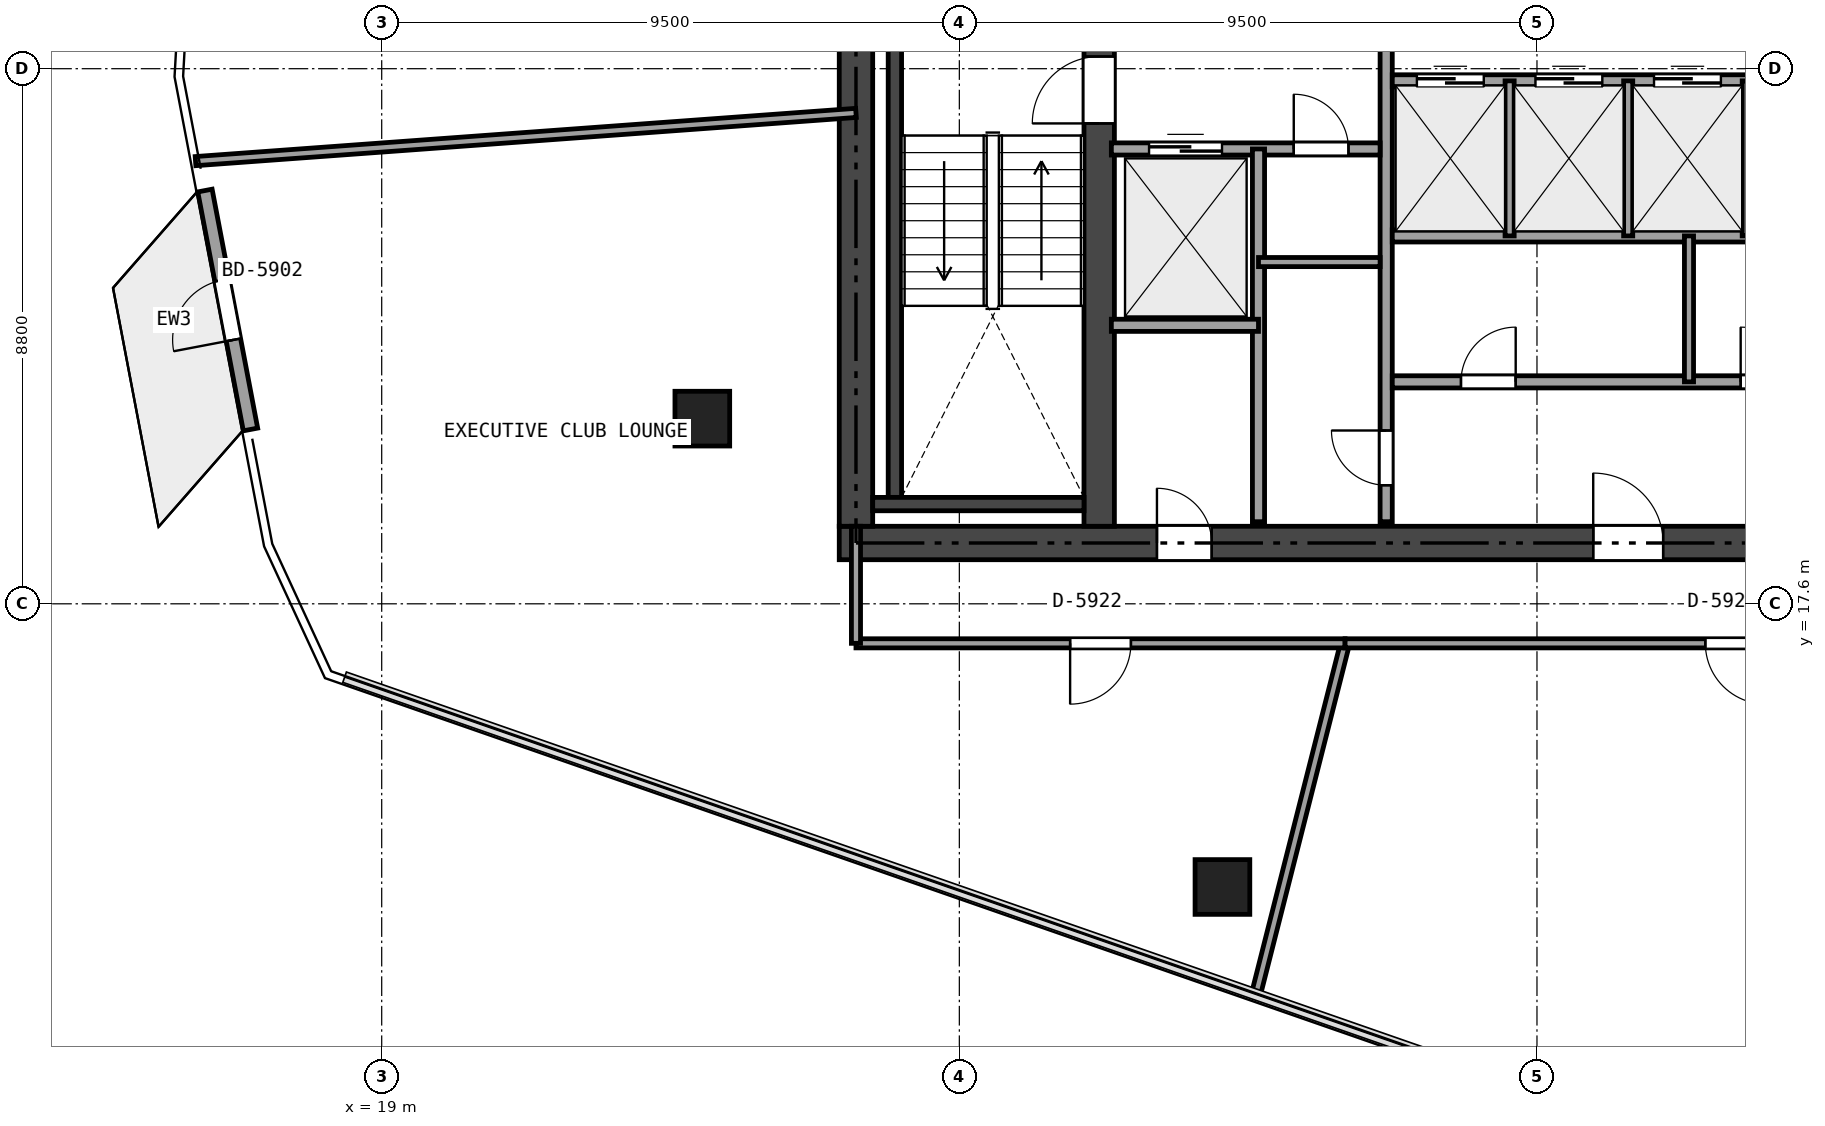
"""IFC4 building model, lengths in metres.
Left out: names, types, materials, properties, quantities, classifications, styles, units other than length and angle.
Written with IfcOpenShell. Run it as: python <this file> out.ifc"""

import sys

from ifc_helpers import new_model, si_unit, direction, frame, frame_2d, origin, origin_2d, place, context, subcontext, project, spatial, rectangle, extrude, element, fill, save


model = new_model("IFC4")
c1 = context("Model", 3, precision=1e-05, world=origin(), true_north=direction((0.0, 1.0)))
c2 = subcontext(c1, "Body", "Model", "MODEL_VIEW")
j1 = project(units=[si_unit("LENGTHUNIT", "METRE"), si_unit("PLANEANGLEUNIT", "RADIAN")], contexts=[c1])
p1 = place(None, origin())
s1 = spatial("IfcSite", under=j1, at=p1, CompositionType="ELEMENT")
p2 = place(p1, origin())
s2 = spatial("IfcBuilding", under=s1, at=p2, CompositionType="ELEMENT")
p3 = place(p2, frame((0.0, 0.0, 220.2)))
s3 = spatial("IfcBuildingStorey", under=s2, at=p3, CompositionType="ELEMENT", Elevation=220.2)
p4 = place(p3, frame((26.525, 18.6, 0.0), z_axis=(0.0, 0.0, 1.0), x_axis=(1.0, 0.0, 0.0)))
e1 = element("IfcWall", 1, at=p4, inside=s3, PredefinedType="SHEAR", context=c2, shape_type="SweptSolid", body=[
    extrude(rectangle(XDim=21.35, YDim=0.55, at=frame_2d((10.675, 0.0))), origin(), (0.0, 0.0, 1.0), 3.24),
])
p5 = place(p4, frame((12.4, 0.0, 0.0)))
e2 = element("IfcOpeningElement", 2, at=p5, cuts=e1, PredefinedType="OPENING", context=c2, shape_type="SweptSolid", body=[
    extrude(rectangle(XDim=1.15, YDim=2.15, at=frame_2d((0.575, 1.075))), frame((0.0, 0.285, 0.0), z_axis=(0.0, -1.0, 0.0), x_axis=(1.0, 0.0, 0.0)), (0.0, 0.0, 1.0), 0.57),
])
p6 = place(p4, frame((5.225, 0.0, 0.0)))
e3 = element("IfcOpeningElement", 3, at=p6, cuts=e1, PredefinedType="OPENING", context=c2, shape_type="SweptSolid", body=[
    extrude(rectangle(XDim=0.9, YDim=2.1, at=frame_2d((0.45, 1.05))), frame((0.0, 0.285, 0.0), z_axis=(0.0, -1.0, 0.0), x_axis=(1.0, 0.0, 0.0)), (0.0, 0.0, 1.0), 0.57),
])
p7 = place(p3, frame((26.8, 18.875, 0.0), z_axis=(0.0, 0.0, 1.0), x_axis=(0.0, 1.0, 0.0)))
e4 = element("IfcWall", 4, at=p7, inside=s3, PredefinedType="SHEAR", context=c2, shape_type="SweptSolid", body=[
    extrude(rectangle(XDim=15.05, YDim=0.55, at=frame_2d((7.525, 0.0))), origin(), (0.0, 0.0, 1.0), 3.24),
])
p8 = place(p3, frame((30.8, 18.875, 0.0), z_axis=(0.0, 0.0, 1.0), x_axis=(0.0, 1.0, 0.0)))
e5 = element("IfcWall", 5, at=p8, inside=s3, PredefinedType="SHEAR", context=c2, shape_type="SweptSolid", body=[
    extrude(rectangle(XDim=15.05, YDim=0.5, at=frame_2d((7.525, 0.0))), origin(), (0.0, 0.0, 1.0), 3.24),
])
p9 = place(p8, frame((6.625, 0.0, 0.0)))
e6 = element("IfcOpeningElement", 6, at=p9, cuts=e5, PredefinedType="OPENING", context=c2, shape_type="SweptSolid", body=[
    extrude(rectangle(XDim=1.1, YDim=2.15, at=frame_2d((0.55, 1.075))), frame((0.0, 0.26, 0.0), z_axis=(0.0, -1.0, 0.0), x_axis=(1.0, 0.0, 0.0)), (0.0, 0.0, 1.0), 0.52),
])
p10 = place(p8, frame((8.425, 0.0, 0.0)))
e7 = element("IfcOpeningElement", 7, at=p10, cuts=e5, PredefinedType="OPENING", context=c2, shape_type="SweptSolid", body=[
    extrude(rectangle(XDim=0.9, YDim=2.1, at=frame_2d((0.45, 1.05))), frame((0.0, 0.26, 0.0), z_axis=(0.0, -1.0, 0.0), x_axis=(1.0, 0.0, 0.0)), (0.0, 0.0, 1.0), 0.52),
])
p11 = place(p3, frame((27.44, 19.35, 0.0), z_axis=(0.0, 0.0, 1.0), x_axis=(0.0, 1.0, 0.0)))
e8 = element("IfcWall", 8, at=p11, inside=s3, PredefinedType="SHEAR", context=c2, shape_type="SweptSolid", body=[
    extrude(rectangle(XDim=7.4, YDim=0.22, at=frame_2d((3.7, 0.0))), origin(), (0.0, 0.0, 1.0), 3.24),
])
p12 = place(p3, frame((27.075, 19.24, 0.0), z_axis=(0.0, 0.0, 1.0), x_axis=(1.0, 0.0, 0.0)))
e9 = element("IfcWall", 9, at=p12, inside=s3, PredefinedType="SHEAR", context=c2, shape_type="SweptSolid", body=[
    extrude(rectangle(XDim=3.475, YDim=0.22, at=frame_2d((1.738, 0.0))), origin(), (0.0, 0.0, 1.0), 3.24),
])
for number, where, z_axis, x_axis in (
    (10, (24.273, 20.645, 0.0), (0.0, 0.0, 1.0), (1.0, 0.0, 0.0)),
    (11, (32.827, 12.943, 0.0), (0.0, 0.0, 1.0), (1.0, 0.0, 0.0)),
):
    element("IfcColumn", number, at=place(p3, frame(where, z_axis=z_axis, x_axis=x_axis)), inside=s3, PredefinedType="COLUMN", context=c2, shape_type="SweptSolid", body=[
        extrude(rectangle(XDim=0.9, YDim=0.9, at=origin_2d()), origin(), (0.0, 0.0, 1.0), 3.24),
    ])
p13 = place(p3, frame((16.842, 20.467, 0.0), z_axis=(0.0, 0.0, 1.0), x_axis=(-0.187269178691, 0.982308635161, 0.0)))
e12 = element("IfcWall", 12, at=p13, inside=s3, PredefinedType="SOLIDWALL", context=c2, shape_type="SweptSolid", body=[
    extrude(rectangle(XDim=4.0, YDim=0.24, at=frame_2d((2.0, 0.0))), origin(), (0.0, 0.0, 1.0), 3.24),
])
p14 = place(p13, frame((1.5, 0.0, 0.0)))
e13 = element("IfcOpeningElement", 13, at=p14, cuts=e12, PredefinedType="OPENING", context=c2, shape_type="SweptSolid", body=[
    extrude(rectangle(XDim=1.0, YDim=2.15, at=frame_2d((0.5, 1.075))), frame((0.0, 0.13, 0.0), z_axis=(0.0, -1.0, 0.0), x_axis=(1.0, 0.0, 0.0)), (0.0, 0.0, 1.0), 0.26),
])
p15 = place(p3, frame((35.52, 18.95, 0.0), z_axis=(0.0, 0.0, 1.0), x_axis=(0.0, 1.0, 0.0)))
e14 = element("IfcWall", 14, at=p15, inside=s3, PredefinedType="SOLIDWALL", context=c2, shape_type="SweptSolid", body=[
    extrude(rectangle(XDim=14.9, YDim=0.2, at=frame_2d((7.45, 0.0))), origin(), (0.0, 0.0, 1.0), 2.761),
])
p16 = place(p15, frame((7.755, 0.0, 0.0)))
e15 = element("IfcOpeningElement", 15, at=p16, cuts=e14, PredefinedType="OPENING", context=c2, shape_type="SweptSolid", body=[
    extrude(rectangle(XDim=0.95, YDim=2.15, at=frame_2d((0.475, 1.075))), frame((0.0, 0.11, 0.0), z_axis=(0.0, -1.0, 0.0), x_axis=(1.0, 0.0, 0.0)), (0.0, 0.0, 1.0), 0.22),
])
p17 = place(p15, frame((0.6, 0.0, 0.0)))
e16 = element("IfcOpeningElement", 16, at=p17, cuts=e14, PredefinedType="OPENING", context=c2, shape_type="SweptSolid", body=[
    extrude(rectangle(XDim=0.9, YDim=2.1, at=frame_2d((0.45, 1.05))), frame((0.0, 0.11, 0.0), z_axis=(0.0, -1.0, 0.0), x_axis=(1.0, 0.0, 0.0)), (0.0, 0.0, 1.0), 0.22),
])
p18 = place(p3, frame((31.0, 25.08, 0.0), z_axis=(0.0, 0.0, 1.0), x_axis=(1.0, 0.0, 0.0)))
e17 = element("IfcWall", 17, at=p18, inside=s3, PredefinedType="SOLIDWALL", context=c2, shape_type="SweptSolid", body=[
    extrude(rectangle(XDim=4.42, YDim=0.2, at=frame_2d((2.21, 0.0))), origin(), (0.0, 0.0, 1.0), 3.24),
])
p19 = place(p18, frame((3.0, 0.0, 0.0)))
e18 = element("IfcOpeningElement", 18, at=p19, cuts=e17, PredefinedType="OPENING", context=c2, shape_type="SweptSolid", body=[
    extrude(rectangle(XDim=0.9, YDim=2.1, at=frame_2d((0.45, 1.05))), frame((0.0, 0.11, 0.0), z_axis=(0.0, -1.0, 0.0), x_axis=(1.0, 0.0, 0.0)), (0.0, 0.0, 1.0), 0.22),
])
p20 = place(p18, frame((0.62, 0.0, 0.0)))
e19 = element("IfcOpeningElement", 19, at=p20, cuts=e17, PredefinedType="OPENING", context=c2, shape_type="SweptSolid", body=[
    extrude(rectangle(XDim=1.2, YDim=2.15, at=frame_2d((0.6, 1.075))), frame((0.0, 0.11, 0.0), z_axis=(0.0, -1.0, 0.0), x_axis=(1.0, 0.0, 0.0)), (0.0, 0.0, 1.0), 0.22),
])
p21 = place(p3, frame((33.42, 18.95, 0.0), z_axis=(0.0, 0.0, 1.0), x_axis=(0.0, 1.0, 0.0)))
e20 = element("IfcWall", 20, at=p21, inside=s3, PredefinedType="SOLIDWALL", context=c2, shape_type="SweptSolid", body=[
    extrude(rectangle(XDim=6.13, YDim=0.2, at=frame_2d((3.065, 0.0))), origin(), (0.0, 0.0, 1.0), 2.761),
])
p22 = place(p3, frame((31.0, 22.18, 0.0), z_axis=(0.0, 0.0, 1.0), x_axis=(1.0, 0.0, 0.0)))
e21 = element("IfcWall", 21, at=p22, inside=s3, PredefinedType="SOLIDWALL", context=c2, shape_type="SweptSolid", body=[
    extrude(rectangle(XDim=2.42, YDim=0.2, at=frame_2d((1.21, 0.0))), origin(), (0.0, 0.0, 1.0), 3.24),
])
p23 = place(p3, frame((33.42, 23.22, 0.0), z_axis=(0.0, 0.0, 1.0), x_axis=(1.0, 0.0, 0.0)))
e22 = element("IfcWall", 22, at=p23, inside=s3, PredefinedType="PARTITIONING", context=c2, shape_type="SweptSolid", body=[
    extrude(rectangle(XDim=2.0, YDim=0.15, at=frame_2d((1.0, 0.0))), origin(), (0.0, 0.0, 1.0), 3.24),
])
p24 = place(p3, frame((35.62, 26.2, 0.0), z_axis=(0.0, 0.0, 1.0), x_axis=(1.0, 0.0, 0.0)))
e23 = element("IfcWall", 23, at=p24, inside=s3, PredefinedType="SOLIDWALL", context=c2, shape_type="SweptSolid", body=[
    extrude(rectangle(XDim=7.88, YDim=0.2, at=frame_2d((3.94, 0.0))), origin(), (0.0, 0.0, 1.0), 3.24),
])
p25 = place(p24, frame((0.405, 0.0, 0.0)))
e24 = element("IfcOpeningElement", 24, at=p25, cuts=e23, PredefinedType="OPENING", context=c2, shape_type="SweptSolid", body=[
    extrude(rectangle(XDim=1.1, YDim=2.15, at=frame_2d((0.55, 1.075))), frame((0.0, 0.11, 0.0), z_axis=(0.0, -1.0, 0.0), x_axis=(1.0, 0.0, 0.0)), (0.0, 0.0, 1.0), 0.22),
])
p26 = place(p24, frame((2.355, 0.0, 0.0)))
e25 = element("IfcOpeningElement", 25, at=p26, cuts=e23, PredefinedType="OPENING", context=c2, shape_type="SweptSolid", body=[
    extrude(rectangle(XDim=1.1, YDim=2.15, at=frame_2d((0.55, 1.075))), frame((0.0, 0.11, 0.0), z_axis=(0.0, -1.0, 0.0), x_axis=(1.0, 0.0, 0.0)), (0.0, 0.0, 1.0), 0.22),
])
p27 = place(p24, frame((4.305, 0.0, 0.0)))
e26 = element("IfcOpeningElement", 26, at=p27, cuts=e23, PredefinedType="OPENING", context=c2, shape_type="SweptSolid", body=[
    extrude(rectangle(XDim=1.1, YDim=2.15, at=frame_2d((0.55, 1.075))), frame((0.0, 0.11, 0.0), z_axis=(0.0, -1.0, 0.0), x_axis=(1.0, 0.0, 0.0)), (0.0, 0.0, 1.0), 0.22),
])
p28 = place(p24, frame((6.255, 0.0, 0.0)))
e27 = element("IfcOpeningElement", 27, at=p28, cuts=e23, PredefinedType="OPENING", context=c2, shape_type="SweptSolid", body=[
    extrude(rectangle(XDim=1.1, YDim=2.15, at=frame_2d((0.55, 1.075))), frame((0.0, 0.11, 0.0), z_axis=(0.0, -1.0, 0.0), x_axis=(1.0, 0.0, 0.0)), (0.0, 0.0, 1.0), 0.22),
])
p29 = place(p3, frame((35.62, 23.65, 0.0), z_axis=(0.0, 0.0, 1.0), x_axis=(1.0, 0.0, 0.0)))
e28 = element("IfcWall", 28, at=p29, inside=s3, PredefinedType="SOLIDWALL", context=c2, shape_type="SweptSolid", body=[
    extrude(rectangle(XDim=7.88, YDim=0.2, at=frame_2d((3.94, 0.0))), origin(), (0.0, 0.0, 1.0), 2.761),
])
p30 = place(p3, frame((35.62, 21.25, 0.0), z_axis=(0.0, 0.0, 1.0), x_axis=(1.0, 0.0, 0.0)))
e29 = element("IfcWall", 29, at=p30, inside=s3, PredefinedType="SOLIDWALL", context=c2, shape_type="SweptSolid", body=[
    extrude(rectangle(XDim=7.88, YDim=0.2, at=frame_2d((3.94, 0.0))), origin(), (0.0, 0.0, 1.0), 3.24),
])
p31 = place(p30, frame((1.13, 0.0, 0.0)))
e30 = element("IfcOpeningElement", 30, at=p31, cuts=e29, PredefinedType="OPENING", context=c2, shape_type="SweptSolid", body=[
    extrude(rectangle(XDim=0.9, YDim=2.1, at=frame_2d((0.45, 1.05))), frame((0.0, 0.11, 0.0), z_axis=(0.0, -1.0, 0.0), x_axis=(1.0, 0.0, 0.0)), (0.0, 0.0, 1.0), 0.22),
])
p32 = place(p30, frame((5.73, 0.0, 0.0)))
e31 = element("IfcOpeningElement", 31, at=p32, cuts=e29, PredefinedType="OPENING", context=c2, shape_type="SweptSolid", body=[
    extrude(rectangle(XDim=0.9, YDim=2.1, at=frame_2d((0.45, 1.05))), frame((0.0, 0.11, 0.0), z_axis=(0.0, -1.0, 0.0), x_axis=(1.0, 0.0, 0.0)), (0.0, 0.0, 1.0), 0.22),
])
for number, where, z_axis, x_axis in (
    (32, (37.55, 23.65, 0.0), (0.0, 0.0, 1.0), (0.0, 1.0, 0.0)),
    (33, (39.5, 23.65, 0.0), (0.0, 0.0, 1.0), (0.0, 1.0, 0.0)),
    (34, (41.45, 23.65, 0.0), (0.0, 0.0, 1.0), (0.0, 1.0, 0.0)),
):
    element("IfcWall", number, at=place(p3, frame(where, z_axis=z_axis, x_axis=x_axis)), inside=s3, PredefinedType="PARTITIONING", context=c2, shape_type="SweptSolid", body=[
        extrude(rectangle(XDim=2.55, YDim=0.15, at=frame_2d((1.275, 0.0))), origin(), (0.0, 0.0, 1.0), 2.761),
    ])
p33 = place(p3, frame((40.5, 21.25, 0.0), z_axis=(0.0, 0.0, 1.0), x_axis=(0.0, 1.0, 0.0)))
e35 = element("IfcWall", 35, at=p33, inside=s3, PredefinedType="PARTITIONING", context=c2, shape_type="SweptSolid", body=[
    extrude(rectangle(XDim=2.4, YDim=0.15, at=frame_2d((1.2, 0.0))), origin(), (0.0, 0.0, 1.0), 2.761),
])
p34 = place(p3, frame((15.938, 24.88, 0.0), z_axis=(0.0, 0.0, 1.0), x_axis=(0.997344218628, 0.072832064155, 0.0)))
e36 = element("IfcWall", 36, at=p34, inside=s3, PredefinedType="PARTITIONING", context=c2, shape_type="SweptSolid", body=[
    extrude(rectangle(XDim=10.891, YDim=0.15, at=frame_2d((5.445, 0.0))), origin(), (0.0, 0.0, 1.0), 2.825),
])
p35 = place(p3, frame((33.367, 11.134, 0.0), z_axis=(0.0, 0.0, 1.0), x_axis=(0.246152632785, 0.969231077387, 0.0)))
e37 = element("IfcWall", 37, at=p35, inside=s3, PredefinedType="PARTITIONING", context=c2, shape_type="SweptSolid", body=[
    extrude(rectangle(XDim=6.0, YDim=0.15, at=frame_2d((3.0, 0.0))), origin(), (0.0, 0.0, 1.0), 2.825),
])
p36 = place(p3, frame((34.844, 16.95, 0.0), z_axis=(0.0, 0.0, 1.0), x_axis=(-1.0, 0.0, 0.0)))
e38 = element("IfcWall", 38, at=p36, inside=s3, PredefinedType="PARTITIONING", context=c2, shape_type="SweptSolid", body=[
    extrude(rectangle(XDim=8.044, YDim=0.15, at=frame_2d((4.022, 0.0))), origin(), (0.0, 0.0, 1.0), 2.617),
])
p37 = place(p36, frame((3.522, 0.0, 0.0)))
e39 = element("IfcOpeningElement", 39, at=p37, cuts=e38, PredefinedType="OPENING", context=c2, shape_type="SweptSolid", body=[
    extrude(rectangle(XDim=1.0, YDim=2.15, at=frame_2d((0.5, 1.075))), frame((0.0, 0.085, 0.0), z_axis=(0.0, -1.0, 0.0), x_axis=(1.0, 0.0, 0.0)), (0.0, 0.0, 1.0), 0.17),
])
p38 = place(p3, frame((26.8, 16.95, 0.0), z_axis=(0.0, 0.0, 1.0), x_axis=(0.0, 1.0, 0.0)))
e40 = element("IfcWall", 40, at=p38, inside=s3, PredefinedType="PARTITIONING", context=c2, shape_type="SweptSolid", body=[
    extrude(rectangle(XDim=1.925, YDim=0.15, at=frame_2d((0.962, 0.0))), origin(), (0.0, 0.0, 1.0), 2.825),
])
p39 = place(p3, frame((47.695, 16.95, 0.0), z_axis=(0.0, 0.0, 1.0), x_axis=(-1.0, 0.0, 0.0)))
e41 = element("IfcWall", 41, at=p39, inside=s3, PredefinedType="PARTITIONING", context=c2, shape_type="SweptSolid", body=[
    extrude(rectangle(XDim=12.851, YDim=0.15, at=frame_2d((6.426, 0.0))), origin(), (0.0, 0.0, 1.0), 2.617),
])
p40 = place(p39, frame((5.926, 0.0, 0.0)))
e42 = element("IfcOpeningElement", 42, at=p40, cuts=e41, PredefinedType="OPENING", context=c2, shape_type="SweptSolid", body=[
    extrude(rectangle(XDim=1.0, YDim=2.15, at=frame_2d((0.5, 1.075))), frame((0.0, 0.085, 0.0), z_axis=(0.0, -1.0, 0.0), x_axis=(1.0, 0.0, 0.0)), (0.0, 0.0, 1.0), 0.17),
])
p41 = place(p14, origin())
e43 = element("IfcDoor", 43, at=p41, inside=s3, OperationType="SINGLE_SWING_LEFT", PredefinedType="DOOR", context=c2, shape_type="SweptSolid", body=[
    extrude(rectangle(XDim=1.0, YDim=2.15, at=frame_2d((0.5, 1.075))), frame((0.0, 0.025, 0.0), z_axis=(0.0, -1.0, 0.0), x_axis=(1.0, 0.0, 0.0)), (0.0, 0.0, 1.0), 0.05),
])
fill(e13, e43)
p42 = place(p9, origin())
e44 = element("IfcDoor", 44, at=p42, inside=s3, OperationType="SINGLE_SWING_LEFT", PredefinedType="DOOR", context=c2, shape_type="SweptSolid", body=[
    extrude(rectangle(XDim=1.1, YDim=2.15, at=frame_2d((0.55, 1.075))), frame((0.0, 0.025, 0.0), z_axis=(0.0, -1.0, 0.0), x_axis=(1.0, 0.0, 0.0)), (0.0, 0.0, 1.0), 0.05),
])
fill(e6, e44)
p43 = place(p5, origin())
e45 = element("IfcDoor", 45, at=p43, inside=s3, OperationType="SINGLE_SWING_LEFT", PredefinedType="DOOR", context=c2, shape_type="SweptSolid", body=[
    extrude(rectangle(XDim=1.15, YDim=2.15, at=frame_2d((0.575, 1.075))), frame((0.0, 0.025, 0.0), z_axis=(0.0, -1.0, 0.0), x_axis=(1.0, 0.0, 0.0)), (0.0, 0.0, 1.0), 0.05),
])
fill(e2, e45)
p44 = place(p6, origin())
e46 = element("IfcDoor", 46, at=p44, inside=s3, OperationType="SINGLE_SWING_LEFT", PredefinedType="DOOR", context=c2, shape_type="SweptSolid", body=[
    extrude(rectangle(XDim=0.9, YDim=2.1, at=frame_2d((0.45, 1.05))), frame((0.0, 0.025, 0.0), z_axis=(0.0, -1.0, 0.0), x_axis=(1.0, 0.0, 0.0)), (0.0, 0.0, 1.0), 0.05),
])
fill(e3, e46)
p45 = place(p17, origin())
e47 = element("IfcDoor", 47, at=p45, inside=s3, OperationType="SINGLE_SWING_RIGHT", PredefinedType="DOOR", context=c2, shape_type="SweptSolid", body=[
    extrude(rectangle(XDim=0.9, YDim=2.1, at=frame_2d((0.45, 1.05))), frame((0.0, 0.025, 0.0), z_axis=(0.0, -1.0, 0.0), x_axis=(1.0, 0.0, 0.0)), (0.0, 0.0, 1.0), 0.05),
])
fill(e16, e47)
p46 = place(p19, origin())
e48 = element("IfcDoor", 48, at=p46, inside=s3, OperationType="SINGLE_SWING_LEFT", PredefinedType="DOOR", context=c2, shape_type="SweptSolid", body=[
    extrude(rectangle(XDim=0.9, YDim=2.1, at=frame_2d((0.45, 1.05))), frame((0.0, 0.025, 0.0), z_axis=(0.0, -1.0, 0.0), x_axis=(1.0, 0.0, 0.0)), (0.0, 0.0, 1.0), 0.05),
])
fill(e18, e48)
p47 = place(p31, origin())
e49 = element("IfcDoor", 49, at=p47, inside=s3, OperationType="SINGLE_SWING_RIGHT", PredefinedType="DOOR", context=c2, shape_type="SweptSolid", body=[
    extrude(rectangle(XDim=0.9, YDim=2.1, at=frame_2d((0.45, 1.05))), frame((0.0, 0.025, 0.0), z_axis=(0.0, -1.0, 0.0), x_axis=(1.0, 0.0, 0.0)), (0.0, 0.0, 1.0), 0.05),
])
fill(e30, e49)
p48 = place(p32, origin())
e50 = element("IfcDoor", 50, at=p48, inside=s3, OperationType="SINGLE_SWING_LEFT", PredefinedType="DOOR", context=c2, shape_type="SweptSolid", body=[
    extrude(rectangle(XDim=0.9, YDim=2.1, at=frame_2d((0.45, 1.05))), frame((0.0, 0.025, 0.0), z_axis=(0.0, -1.0, 0.0), x_axis=(1.0, 0.0, 0.0)), (0.0, 0.0, 1.0), 0.05),
])
fill(e31, e50)
p49 = place(p20, origin())
e51 = element("IfcDoor", 51, at=p49, inside=s3, OperationType="SLIDING_TO_LEFT", PredefinedType="DOOR", context=c2, shape_type="SweptSolid", body=[
    extrude(rectangle(XDim=1.2, YDim=2.15, at=frame_2d((0.6, 1.075))), frame((0.0, 0.025, 0.0), z_axis=(0.0, -1.0, 0.0), x_axis=(1.0, 0.0, 0.0)), (0.0, 0.0, 1.0), 0.05),
])
fill(e19, e51)
p50 = place(p25, origin())
e52 = element("IfcDoor", 52, at=p50, inside=s3, OperationType="SLIDING_TO_LEFT", PredefinedType="DOOR", context=c2, shape_type="SweptSolid", body=[
    extrude(rectangle(XDim=1.1, YDim=2.15, at=frame_2d((0.55, 1.075))), frame((0.0, 0.025, 0.0), z_axis=(0.0, -1.0, 0.0), x_axis=(1.0, 0.0, 0.0)), (0.0, 0.0, 1.0), 0.05),
])
fill(e24, e52)
p51 = place(p26, origin())
e53 = element("IfcDoor", 53, at=p51, inside=s3, OperationType="SLIDING_TO_LEFT", PredefinedType="DOOR", context=c2, shape_type="SweptSolid", body=[
    extrude(rectangle(XDim=1.1, YDim=2.15, at=frame_2d((0.55, 1.075))), frame((0.0, 0.025, 0.0), z_axis=(0.0, -1.0, 0.0), x_axis=(1.0, 0.0, 0.0)), (0.0, 0.0, 1.0), 0.05),
])
fill(e25, e53)
p52 = place(p27, origin())
e54 = element("IfcDoor", 54, at=p52, inside=s3, OperationType="SLIDING_TO_LEFT", PredefinedType="DOOR", context=c2, shape_type="SweptSolid", body=[
    extrude(rectangle(XDim=1.1, YDim=2.15, at=frame_2d((0.55, 1.075))), frame((0.0, 0.025, 0.0), z_axis=(0.0, -1.0, 0.0), x_axis=(1.0, 0.0, 0.0)), (0.0, 0.0, 1.0), 0.05),
])
fill(e26, e54)
p53 = place(p37, origin())
e55 = element("IfcDoor", 55, at=p53, inside=s3, OperationType="SINGLE_SWING_RIGHT", PredefinedType="DOOR", context=c2, shape_type="SweptSolid", body=[
    extrude(rectangle(XDim=1.0, YDim=2.15, at=frame_2d((0.5, 1.075))), frame((0.0, 0.025, 0.0), z_axis=(0.0, -1.0, 0.0), x_axis=(1.0, 0.0, 0.0)), (0.0, 0.0, 1.0), 0.05),
])
fill(e39, e55)
p54 = place(p40, origin())
e56 = element("IfcDoor", 56, at=p54, inside=s3, OperationType="SINGLE_SWING_LEFT", PredefinedType="DOOR", context=c2, shape_type="SweptSolid", body=[
    extrude(rectangle(XDim=1.0, YDim=2.15, at=frame_2d((0.5, 1.075))), frame((0.0, 0.025, 0.0), z_axis=(0.0, -1.0, 0.0), x_axis=(1.0, 0.0, 0.0)), (0.0, 0.0, 1.0), 0.05),
])
fill(e42, e56)
save(model, sys.argv[1])
